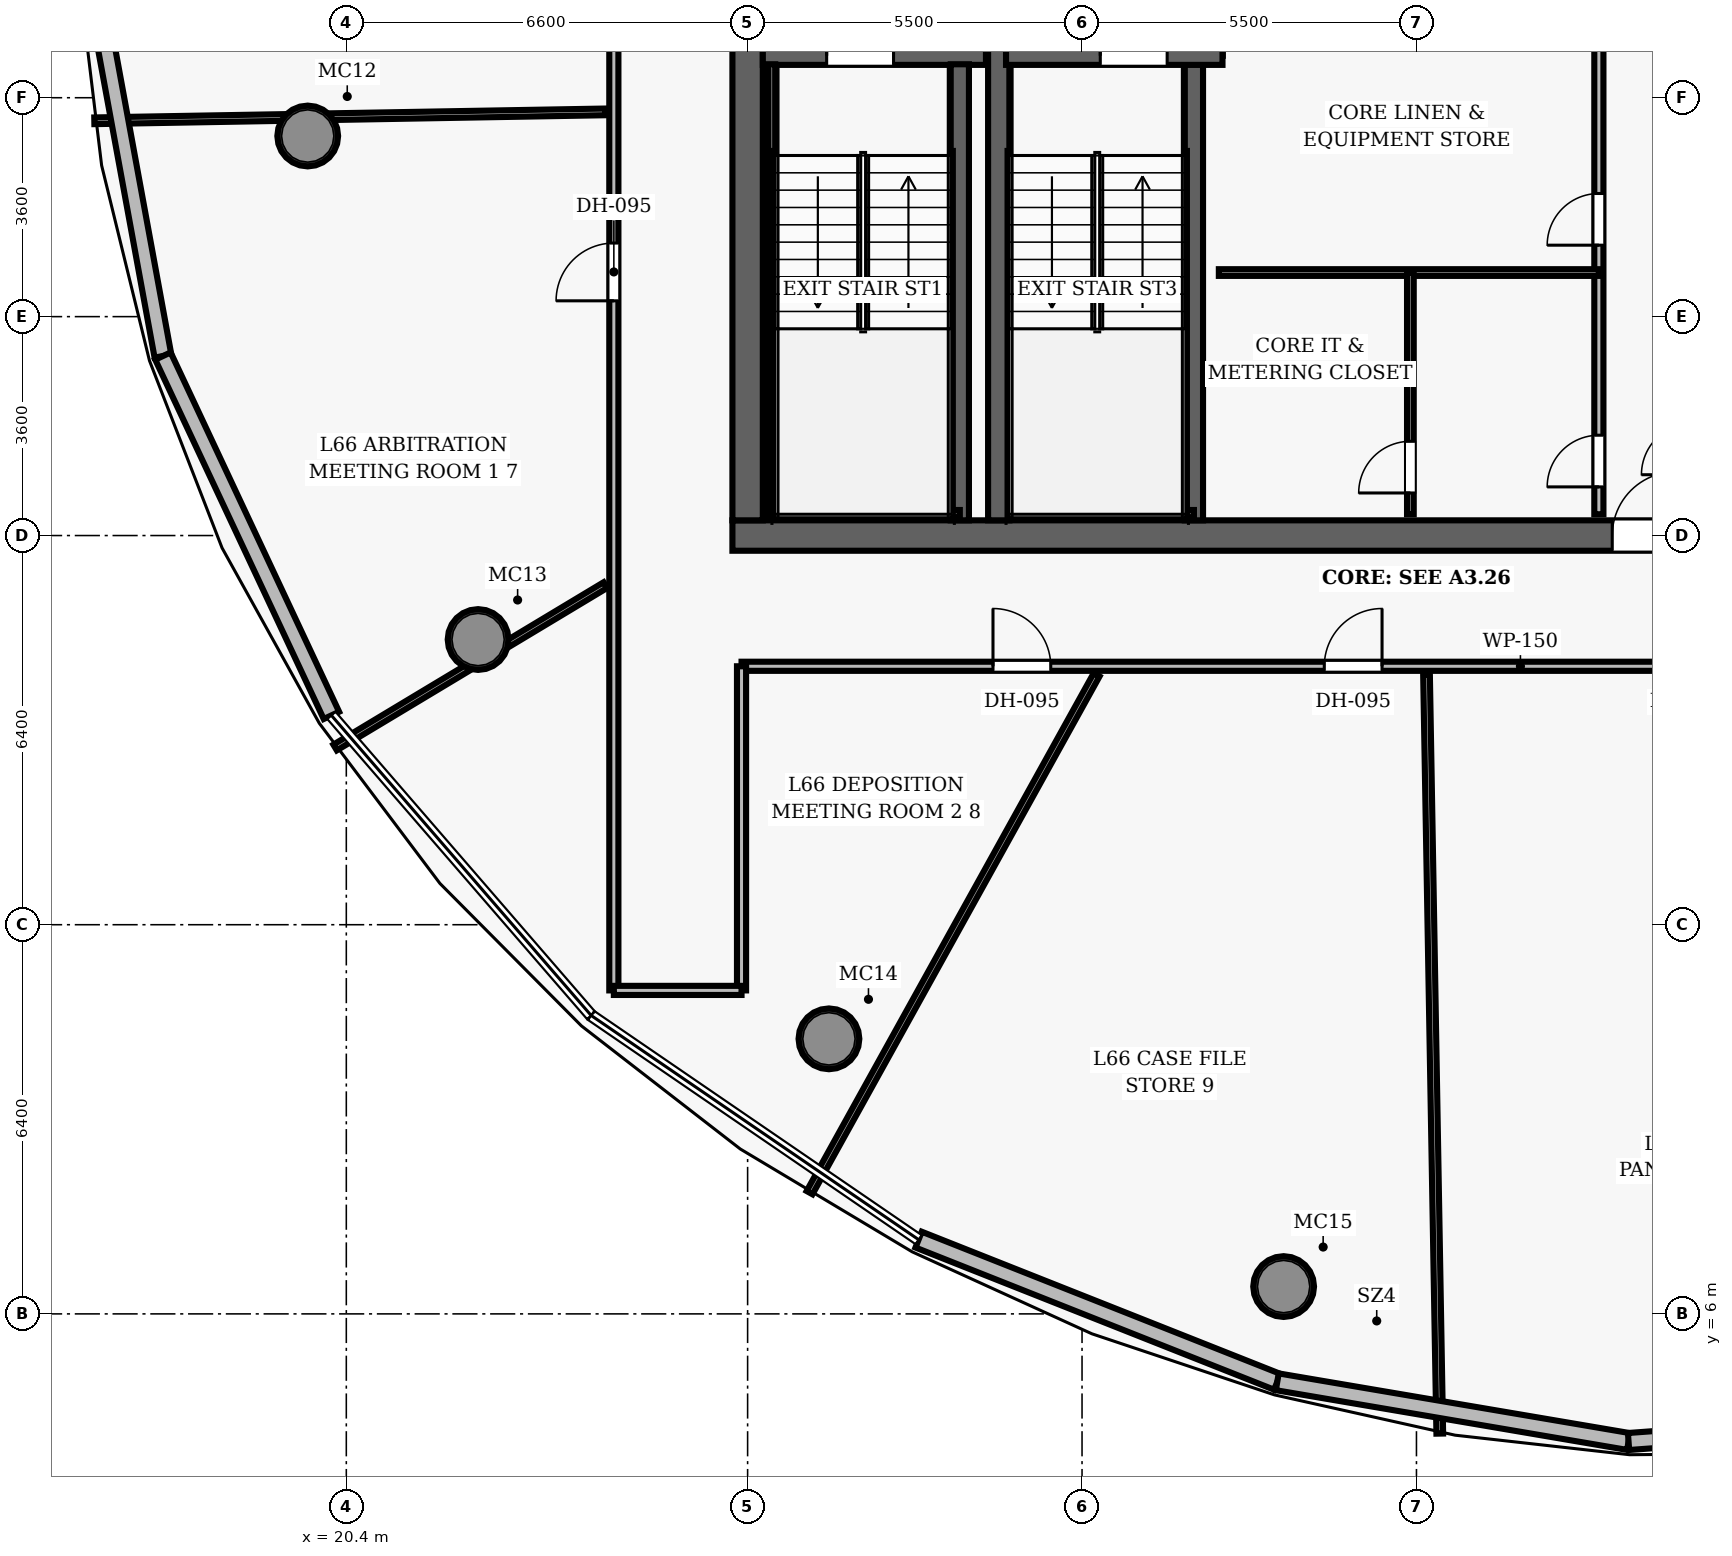
"""IFC4 building model, lengths in metres.
Left out: names, types, materials, properties, quantities, classifications, styles, units other than length and angle.
Written with IfcOpenShell. Run it as: python <this file> out.ifc"""

import sys

from ifc_helpers import new_model, si_unit, direction, frame, frame_2d, origin, origin_2d, place, context, subcontext, project, spatial, rectangle, hollow_circle, extrude, element, fill, save


model = new_model("IFC4")
c1 = context("Model", 3, precision=1e-05, world=origin(), true_north=direction((0.0, 1.0)))
c2 = subcontext(c1, "Body", "Model", "MODEL_VIEW")
j1 = project(units=[si_unit("LENGTHUNIT", "METRE"), si_unit("PLANEANGLEUNIT", "RADIAN")], contexts=[c1])
p1 = place(None, origin())
s1 = spatial("IfcSite", under=j1, at=p1, CompositionType="ELEMENT")
p2 = place(p1, origin())
s2 = spatial("IfcBuilding", under=s1, at=p2, CompositionType="ELEMENT")
p3 = place(p2, frame((0.0, 0.0, 261.3)))
s3 = spatial("IfcBuildingStorey", under=s2, at=p3, CompositionType="ELEMENT", Elevation=261.3)
p4 = place(p3, frame((26.75, 18.8, 0.0), z_axis=(0.0, 0.0, 1.0), x_axis=(1.0, 0.0, 0.0)))
e1 = element("IfcWall", 1, at=p4, inside=s3, PredefinedType="SHEAR", context=c2, shape_type="SweptSolid", body=[
    extrude(rectangle(XDim=22.5, YDim=0.5, at=frame_2d((11.25, 0.0))), origin(), (0.0, 0.0, 1.0), 3.85),
])
p5 = place(p4, frame((14.47, 0.0, 0.0)))
e2 = element("IfcOpeningElement", 2, at=p5, cuts=e1, PredefinedType="OPENING", context=c2, shape_type="SweptSolid", body=[
    extrude(rectangle(XDim=1.05, YDim=2.15, at=frame_2d((0.525, 1.075))), frame((0.0, 0.26, 0.0), z_axis=(0.0, -1.0, 0.0), x_axis=(1.0, 0.0, 0.0)), (0.0, 0.0, 1.0), 0.52),
])
p6 = place(p3, frame((27.0, 19.05, 0.0), z_axis=(0.0, 0.0, 1.0), x_axis=(0.0, 1.0, 0.0)))
e3 = element("IfcWall", 3, at=p6, inside=s3, PredefinedType="SHEAR", context=c2, shape_type="SweptSolid", body=[
    extrude(rectangle(XDim=13.9, YDim=0.5, at=frame_2d((6.95, 0.0))), origin(), (0.0, 0.0, 1.0), 3.85),
])
p7 = place(p6, frame((8.2, 0.0, 0.0)))
e4 = element("IfcOpeningElement", 4, at=p7, cuts=e3, PredefinedType="OPENING", context=c2, shape_type="SweptSolid", body=[
    extrude(rectangle(XDim=1.05, YDim=2.15, at=frame_2d((0.525, 1.075))), frame((0.0, 0.26, 0.0), z_axis=(0.0, -1.0, 0.0), x_axis=(1.0, 0.0, 0.0)), (0.0, 0.0, 1.0), 0.52),
])
p8 = place(p3, frame((31.13, 19.05, 0.0), z_axis=(0.0, 0.0, 1.0), x_axis=(0.0, 1.0, 0.0)))
e5 = element("IfcWall", 5, at=p8, inside=s3, PredefinedType="SHEAR", context=c2, shape_type="SweptSolid", body=[
    extrude(rectangle(XDim=13.9, YDim=0.35, at=frame_2d((6.95, 0.0))), origin(), (0.0, 0.0, 1.0), 3.85),
])
for number, where, z_axis, x_axis in (
    (6, (19.765, 25.371, 0.0), (0.0, 0.0, 1.0), (1.0, 0.0, 0.0)),
    (7, (22.567, 17.09, 0.0), (0.0, 0.0, 1.0), (1.0, 0.0, 0.0)),
    (8, (28.338, 10.523, 0.0), (0.0, 0.0, 1.0), (1.0, 0.0, 0.0)),
    (9, (35.815, 6.449, 0.0), (0.0, 0.0, 1.0), (1.0, 0.0, 0.0)),
):
    element("IfcColumn", number, at=place(p3, frame(where, z_axis=z_axis, x_axis=x_axis)), inside=s3, PredefinedType="COLUMN", context=c2, shape_type="SweptSolid", body=[
        extrude(hollow_circle(Radius=0.5, WallThickness=0.045, at=origin_2d()), origin(), (0.0, 0.0, 1.0), 3.85),
    ])
p9 = place(p3, frame((27.25, 26.69, 0.0), z_axis=(0.0, 0.0, 1.0), x_axis=(1.0, 0.0, 0.0)))
e10 = element("IfcWall", 10, at=p9, inside=s3, PredefinedType="SHEAR", context=c2, shape_type="SweptSolid", body=[
    extrude(rectangle(XDim=3.67, YDim=0.3, at=frame_2d((1.835, 0.0))), origin(), (0.0, 0.0, 1.0), 3.85),
])
p10 = place(p9, frame((1.05, 0.0, 0.0)))
e11 = element("IfcOpeningElement", 11, at=p10, cuts=e10, PredefinedType="OPENING", context=c2, shape_type="SweptSolid", body=[
    extrude(rectangle(XDim=1.1, YDim=2.15, at=frame_2d((0.55, 1.075))), frame((0.0, 0.16, 0.0), z_axis=(0.0, -1.0, 0.0), x_axis=(1.0, 0.0, 0.0)), (0.0, 0.0, 1.0), 0.32),
])
p11 = place(p3, frame((30.49, 19.05, 0.0), z_axis=(0.0, 0.0, 1.0), x_axis=(0.0, 1.0, 0.0)))
e12 = element("IfcWall", 12, at=p11, inside=s3, PredefinedType="SHEAR", context=c2, shape_type="SweptSolid", body=[
    extrude(rectangle(XDim=7.5, YDim=0.3, at=frame_2d((3.75, 0.0))), origin(), (0.0, 0.0, 1.0), 3.85),
])
p12 = place(p3, frame((27.395, 19.1, 0.0), z_axis=(0.0, 0.0, 1.0), x_axis=(0.0, 1.0, 0.0)))
e13 = element("IfcWall", 13, at=p12, inside=s3, PredefinedType="SHEAR", context=c2, shape_type="SweptSolid", body=[
    extrude(rectangle(XDim=7.45, YDim=0.12, at=frame_2d((3.725, 0.0))), origin(), (0.0, 0.0, 1.0), 3.85),
])
p13 = place(p3, frame((27.395, 19.16, 0.0), z_axis=(0.0, 0.0, 1.0), x_axis=(1.0, 0.0, 0.0)))
e14 = element("IfcWall", 14, at=p13, inside=s3, PredefinedType="SHEAR", context=c2, shape_type="SweptSolid", body=[
    extrude(rectangle(XDim=3.095, YDim=0.12, at=frame_2d((1.547, 0.0))), origin(), (0.0, 0.0, 1.0), 3.85),
])
p14 = place(p3, frame((34.34, 19.05, 0.0), z_axis=(0.0, 0.0, 1.0), x_axis=(0.0, 1.0, 0.0)))
e15 = element("IfcWall", 15, at=p14, inside=s3, PredefinedType="SHEAR", context=c2, shape_type="SweptSolid", body=[
    extrude(rectangle(XDim=7.5, YDim=0.3, at=frame_2d((3.75, 0.0))), origin(), (0.0, 0.0, 1.0), 3.85),
])
p15 = place(p3, frame((34.64, 26.69, 0.0), z_axis=(0.0, 0.0, 1.0), x_axis=(0.0, 1.0, 0.0)))
e16 = element("IfcWall", 16, at=p15, inside=s3, PredefinedType="SHEAR", context=c2, shape_type="SweptSolid", body=[
    extrude(rectangle(XDim=6.26, YDim=0.35, at=frame_2d((3.13, 0.0))), origin(), (0.0, 0.0, 1.0), 3.85),
])
p16 = place(p15, frame((0.85, 0.0, 0.0)))
e17 = element("IfcOpeningElement", 17, at=p16, cuts=e16, PredefinedType="OPENING", context=c2, shape_type="SweptSolid", body=[
    extrude(rectangle(XDim=1.05, YDim=2.15, at=frame_2d((0.525, 1.075))), frame((0.0, 0.185, 0.0), z_axis=(0.0, -1.0, 0.0), x_axis=(1.0, 0.0, 0.0)), (0.0, 0.0, 1.0), 0.37),
])
p17 = place(p3, frame((31.25, 26.69, 0.0), z_axis=(0.0, 0.0, 1.0), x_axis=(1.0, 0.0, 0.0)))
e18 = element("IfcWall", 18, at=p17, inside=s3, PredefinedType="SHEAR", context=c2, shape_type="SweptSolid", body=[
    extrude(rectangle(XDim=3.56, YDim=0.3, at=frame_2d((1.78, 0.0))), origin(), (0.0, 0.0, 1.0), 3.85),
])
p18 = place(p17, frame((1.55, 0.0, 0.0)))
e19 = element("IfcOpeningElement", 19, at=p18, cuts=e18, PredefinedType="OPENING", context=c2, shape_type="SweptSolid", body=[
    extrude(rectangle(XDim=1.1, YDim=2.15, at=frame_2d((0.55, 1.075))), frame((0.0, 0.16, 0.0), z_axis=(0.0, -1.0, 0.0), x_axis=(1.0, 0.0, 0.0)), (0.0, 0.0, 1.0), 0.32),
])
p19 = place(p3, frame((31.3, 19.16, 0.0), z_axis=(0.0, 0.0, 1.0), x_axis=(1.0, 0.0, 0.0)))
e20 = element("IfcWall", 20, at=p19, inside=s3, PredefinedType="SHEAR", context=c2, shape_type="SweptSolid", body=[
    extrude(rectangle(XDim=3.04, YDim=0.12, at=frame_2d((1.52, 0.0))), origin(), (0.0, 0.0, 1.0), 3.85),
])
p20 = place(p3, frame((41.0, 19.15, 0.0), z_axis=(0.0, 0.0, 1.0), x_axis=(0.0, 1.0, 0.0)))
e21 = element("IfcWall", 21, at=p20, inside=s3, PredefinedType="PARTITIONING", context=c2, shape_type="SweptSolid", body=[
    extrude(rectangle(XDim=7.95, YDim=0.15, at=frame_2d((3.975, 0.0))), origin(), (0.0, 0.0, 1.0), 3.04),
])
p21 = place(p20, frame((4.425, 0.0, 0.0)))
e22 = element("IfcOpeningElement", 22, at=p21, cuts=e21, PredefinedType="OPENING", context=c2, shape_type="SweptSolid", body=[
    extrude(rectangle(XDim=0.85, YDim=2.1, at=frame_2d((0.425, 1.05))), frame((0.0, 0.085, 0.0), z_axis=(0.0, -1.0, 0.0), x_axis=(1.0, 0.0, 0.0)), (0.0, 0.0, 1.0), 0.17),
])
p22 = place(p20, frame((0.45, 0.0, 0.0)))
e23 = element("IfcOpeningElement", 23, at=p22, cuts=e21, PredefinedType="OPENING", context=c2, shape_type="SweptSolid", body=[
    extrude(rectangle(XDim=0.85, YDim=2.1, at=frame_2d((0.425, 1.05))), frame((0.0, 0.085, 0.0), z_axis=(0.0, -1.0, 0.0), x_axis=(1.0, 0.0, 0.0)), (0.0, 0.0, 1.0), 0.17),
])
p23 = place(p3, frame((34.75, 23.125, 0.0), z_axis=(0.0, 0.0, 1.0), x_axis=(1.0, 0.0, 0.0)))
e24 = element("IfcWall", 24, at=p23, inside=s3, PredefinedType="PARTITIONING", context=c2, shape_type="SweptSolid", body=[
    extrude(rectangle(XDim=6.25, YDim=0.11, at=frame_2d((3.125, 0.0))), origin(), (0.0, 0.0, 1.0), 3.04),
])
p24 = place(p3, frame((37.9, 19.15, 0.0), z_axis=(0.0, 0.0, 1.0), x_axis=(0.0, 1.0, 0.0)))
e25 = element("IfcWall", 25, at=p24, inside=s3, PredefinedType="PARTITIONING", context=c2, shape_type="SweptSolid", body=[
    extrude(rectangle(XDim=3.975, YDim=0.11, at=frame_2d((1.988, 0.0))), origin(), (0.0, 0.0, 1.0), 3.04),
])
p25 = place(p24, frame((0.35, 0.0, 0.0)))
e26 = element("IfcOpeningElement", 26, at=p25, cuts=e25, PredefinedType="OPENING", context=c2, shape_type="SweptSolid", body=[
    extrude(rectangle(XDim=0.85, YDim=2.1, at=frame_2d((0.425, 1.05))), frame((0.0, 0.065, 0.0), z_axis=(0.0, -1.0, 0.0), x_axis=(1.0, 0.0, 0.0)), (0.0, 0.0, 1.0), 0.13),
])
p26 = place(p3, frame((26.9, 16.65, 0.0), z_axis=(0.0, 0.0, 1.0), x_axis=(1.0, 0.0, 0.0)))
e27 = element("IfcWall", 27, at=p26, inside=s3, PredefinedType="PARTITIONING", context=c2, shape_type="SweptSolid", body=[
    extrude(rectangle(XDim=22.2, YDim=0.15, at=frame_2d((11.1, 0.0))), origin(), (0.0, 0.0, 1.0), 3.04),
])
p27 = place(p26, frame((4.135, 0.0, 0.0)))
e28 = element("IfcOpeningElement", 28, at=p27, cuts=e27, PredefinedType="OPENING", context=c2, shape_type="SweptSolid", body=[
    extrude(rectangle(XDim=0.95, YDim=2.15, at=frame_2d((0.475, 1.075))), frame((0.0, 0.085, 0.0), z_axis=(0.0, -1.0, 0.0), x_axis=(1.0, 0.0, 0.0)), (0.0, 0.0, 1.0), 0.17),
])
p28 = place(p26, frame((9.584, 0.0, 0.0)))
e29 = element("IfcOpeningElement", 29, at=p28, cuts=e27, PredefinedType="OPENING", context=c2, shape_type="SweptSolid", body=[
    extrude(rectangle(XDim=0.95, YDim=2.15, at=frame_2d((0.475, 1.075))), frame((0.0, 0.085, 0.0), z_axis=(0.0, -1.0, 0.0), x_axis=(1.0, 0.0, 0.0)), (0.0, 0.0, 1.0), 0.17),
])
p29 = place(p26, frame((15.086, 0.0, 0.0)))
e30 = element("IfcOpeningElement", 30, at=p29, cuts=e27, PredefinedType="OPENING", context=c2, shape_type="SweptSolid", body=[
    extrude(rectangle(XDim=0.95, YDim=2.15, at=frame_2d((0.475, 1.075))), frame((0.0, 0.085, 0.0), z_axis=(0.0, -1.0, 0.0), x_axis=(1.0, 0.0, 0.0)), (0.0, 0.0, 1.0), 0.17),
])
p30 = place(p26, frame((17.445, 0.0, 0.0)))
e31 = element("IfcOpeningElement", 31, at=p30, cuts=e27, PredefinedType="OPENING", context=c2, shape_type="SweptSolid", body=[
    extrude(rectangle(XDim=0.95, YDim=2.15, at=frame_2d((0.475, 1.075))), frame((0.0, 0.085, 0.0), z_axis=(0.0, -1.0, 0.0), x_axis=(1.0, 0.0, 0.0)), (0.0, 0.0, 1.0), 0.17),
])
p31 = place(p3, frame((24.8, 11.32, 0.0), z_axis=(0.0, 0.0, 1.0), x_axis=(0.0, 1.0, 0.0)))
e32 = element("IfcWall", 32, at=p31, inside=s3, PredefinedType="PARTITIONING", context=c2, shape_type="SweptSolid", body=[
    extrude(rectangle(XDim=30.08, YDim=0.15, at=frame_2d((15.04, 0.0))), origin(), (0.0, 0.0, 1.0), 3.04),
])
p32 = place(p31, frame((15.729, 0.0, 0.0)))
e33 = element("IfcOpeningElement", 33, at=p32, cuts=e32, PredefinedType="OPENING", context=c2, shape_type="SweptSolid", body=[
    extrude(rectangle(XDim=0.95, YDim=2.15, at=frame_2d((0.475, 1.075))), frame((0.0, 0.085, 0.0), z_axis=(0.0, -1.0, 0.0), x_axis=(1.0, 0.0, 0.0)), (0.0, 0.0, 1.0), 0.17),
])
p33 = place(p31, frame((11.34, 0.0, 0.0)))
e34 = element("IfcOpeningElement", 34, at=p33, cuts=e32, PredefinedType="OPENING", context=c2, shape_type="SweptSolid", body=[
    extrude(rectangle(XDim=0.95, YDim=2.15, at=frame_2d((0.475, 1.075))), frame((0.0, 0.085, 0.0), z_axis=(0.0, -1.0, 0.0), x_axis=(1.0, 0.0, 0.0)), (0.0, 0.0, 1.0), 0.17),
])
p34 = place(p3, frame((26.9, 11.32, 0.0), z_axis=(0.0, 0.0, 1.0), x_axis=(0.0, 1.0, 0.0)))
e35 = element("IfcWall", 35, at=p34, inside=s3, PredefinedType="PARTITIONING", context=c2, shape_type="SweptSolid", body=[
    extrude(rectangle(XDim=5.33, YDim=0.15, at=frame_2d((2.665, 0.0))), origin(), (0.0, 0.0, 1.0), 3.04),
])
p35 = place(p3, frame((24.8, 11.32, 0.0), z_axis=(0.0, 0.0, 1.0), x_axis=(1.0, 0.0, 0.0)))
e36 = element("IfcWall", 36, at=p35, inside=s3, PredefinedType="PARTITIONING", context=c2, shape_type="SweptSolid", body=[
    extrude(rectangle(XDim=2.1, YDim=0.15, at=frame_2d((1.05, 0.0))), origin(), (0.0, 0.0, 1.0), 3.04),
])
p36 = place(p3, frame((24.66, 25.767, 0.0), z_axis=(0.0, 0.0, 1.0), x_axis=(-0.999848137376, -0.017427053289, 0.0)))
e37 = element("IfcWall", 37, at=p36, inside=s3, PredefinedType="PARTITIONING", context=c2, shape_type="SweptSolid", body=[
    extrude(rectangle(XDim=8.406, YDim=0.11, at=frame_2d((4.203, 0.0))), origin(), (0.0, 0.0, 1.0), 3.04),
])
p37 = place(p3, frame((24.66, 17.985, 0.0), z_axis=(0.0, 0.0, 1.0), x_axis=(-0.857168687415, -0.515035767026, 0.0)))
e38 = element("IfcWall", 38, at=p37, inside=s3, PredefinedType="PARTITIONING", context=c2, shape_type="SweptSolid", body=[
    extrude(rectangle(XDim=5.185, YDim=0.11, at=frame_2d((2.592, 0.0))), origin(), (0.0, 0.0, 1.0), 3.04),
])
p38 = place(p3, frame((32.74, 16.51, 0.0), z_axis=(0.0, 0.0, 1.0), x_axis=(-0.484810336768, -0.874619309965, 0.0)))
e39 = element("IfcWall", 39, at=p38, inside=s3, PredefinedType="PARTITIONING", context=c2, shape_type="SweptSolid", body=[
    extrude(rectangle(XDim=9.737, YDim=0.11, at=frame_2d((4.869, 0.0))), origin(), (0.0, 0.0, 1.0), 3.04),
])
p39 = place(p3, frame((38.166, 16.51, 0.0), z_axis=(0.0, 0.0, 1.0), x_axis=(0.017468427639, -0.999847415377, 0.0)))
e40 = element("IfcWall", 40, at=p39, inside=s3, PredefinedType="PARTITIONING", context=c2, shape_type="SweptSolid", body=[
    extrude(rectangle(XDim=12.481, YDim=0.11, at=frame_2d((6.24, 0.0))), origin(), (0.0, 0.0, 1.0), 3.04),
])
p40 = place(p3, frame((17.385, 21.752, 0.0), z_axis=(0.0, 0.0, 1.0), x_axis=(-0.180429210123, 0.983587972748, 0.0)))
e41 = element("IfcWall", 41, at=p40, inside=s3, PredefinedType="SOLIDWALL", context=c2, shape_type="SweptSolid", body=[
    extrude(rectangle(XDim=6.526, YDim=0.28, at=frame_2d((3.263, 0.0))), origin(), (0.0, 0.0, 1.0), 3.625),
])
p41 = place(p3, frame((20.155, 15.842, 0.0), z_axis=(0.0, 0.0, 1.0), x_axis=(-0.424477959748, 0.905438270501, 0.0)))
e42 = element("IfcWall", 42, at=p41, inside=s3, PredefinedType="SOLIDWALL", context=c2, shape_type="SweptSolid", body=[
    extrude(rectangle(XDim=6.527, YDim=0.28, at=frame_2d((3.263, 0.0))), origin(), (0.0, 0.0, 1.0), 3.625),
])
p42 = place(p3, frame((35.711, 4.883, 0.0), z_axis=(0.0, 0.0, 1.0), x_axis=(-0.929644948575, 0.368456604758, 0.0)))
e43 = element("IfcWall", 43, at=p42, inside=s3, PredefinedType="SOLIDWALL", context=c2, shape_type="SweptSolid", body=[
    extrude(rectangle(XDim=6.345, YDim=0.28, at=frame_2d((3.172, 0.0))), origin(), (0.0, 0.0, 1.0), 3.625),
])
p43 = place(p3, frame((41.488, 3.901, 0.0), z_axis=(0.0, 0.0, 1.0), x_axis=(-0.985868784633, 0.167519370479, 0.0)))
e44 = element("IfcWall", 44, at=p43, inside=s3, PredefinedType="SOLIDWALL", context=c2, shape_type="SweptSolid", body=[
    extrude(rectangle(XDim=5.86, YDim=0.28, at=frame_2d((2.93, 0.0))), origin(), (0.0, 0.0, 1.0), 3.625),
])
p44 = place(p3, frame((46.654, 4.28, 0.0), z_axis=(0.0, 0.0, 1.0), x_axis=(-0.99732023432, -0.073159758173, 0.0)))
e45 = element("IfcWall", 45, at=p44, inside=s3, PredefinedType="SOLIDWALL", context=c2, shape_type="SweptSolid", body=[
    extrude(rectangle(XDim=5.179, YDim=0.28, at=frame_2d((2.59, 0.0))), origin(), (0.0, 0.0, 1.0), 3.625),
])
p45 = place(p10, origin())
e46 = element("IfcDoor", 46, at=p45, inside=s3, OperationType="SINGLE_SWING_LEFT", PredefinedType="DOOR", context=c2, shape_type="SweptSolid", body=[
    extrude(rectangle(XDim=1.1, YDim=2.15, at=frame_2d((0.55, 1.075))), frame((0.0, 0.025, 0.0), z_axis=(0.0, -1.0, 0.0), x_axis=(1.0, 0.0, 0.0)), (0.0, 0.0, 1.0), 0.05),
])
fill(e11, e46)
p46 = place(p18, origin())
e47 = element("IfcDoor", 47, at=p46, inside=s3, OperationType="SINGLE_SWING_LEFT", PredefinedType="DOOR", context=c2, shape_type="SweptSolid", body=[
    extrude(rectangle(XDim=1.1, YDim=2.15, at=frame_2d((0.55, 1.075))), frame((0.0, 0.025, 0.0), z_axis=(0.0, -1.0, 0.0), x_axis=(1.0, 0.0, 0.0)), (0.0, 0.0, 1.0), 0.05),
])
fill(e19, e47)
p47 = place(p5, origin())
e48 = element("IfcDoor", 48, at=p47, inside=s3, OperationType="SINGLE_SWING_RIGHT", PredefinedType="DOOR", context=c2, shape_type="SweptSolid", body=[
    extrude(rectangle(XDim=1.05, YDim=2.15, at=frame_2d((0.525, 1.075))), frame((0.0, 0.025, 0.0), z_axis=(0.0, -1.0, 0.0), x_axis=(1.0, 0.0, 0.0)), (0.0, 0.0, 1.0), 0.05),
])
fill(e2, e48)
p48 = place(p21, origin())
e49 = element("IfcDoor", 49, at=p48, inside=s3, OperationType="SINGLE_SWING_LEFT", PredefinedType="DOOR", context=c2, shape_type="SweptSolid", body=[
    extrude(rectangle(XDim=0.85, YDim=2.1, at=frame_2d((0.425, 1.05))), frame((0.0, 0.025, 0.0), z_axis=(0.0, -1.0, 0.0), x_axis=(1.0, 0.0, 0.0)), (0.0, 0.0, 1.0), 0.05),
])
fill(e22, e49)
p49 = place(p22, origin())
e50 = element("IfcDoor", 50, at=p49, inside=s3, OperationType="SINGLE_SWING_LEFT", PredefinedType="DOOR", context=c2, shape_type="SweptSolid", body=[
    extrude(rectangle(XDim=0.85, YDim=2.1, at=frame_2d((0.425, 1.05))), frame((0.0, 0.025, 0.0), z_axis=(0.0, -1.0, 0.0), x_axis=(1.0, 0.0, 0.0)), (0.0, 0.0, 1.0), 0.05),
])
fill(e23, e50)
p50 = place(p25, origin())
e51 = element("IfcDoor", 51, at=p50, inside=s3, OperationType="SINGLE_SWING_LEFT", PredefinedType="DOOR", context=c2, shape_type="SweptSolid", body=[
    extrude(rectangle(XDim=0.85, YDim=2.1, at=frame_2d((0.425, 1.05))), frame((0.0, 0.025, 0.0), z_axis=(0.0, -1.0, 0.0), x_axis=(1.0, 0.0, 0.0)), (0.0, 0.0, 1.0), 0.05),
])
fill(e26, e51)
p51 = place(p33, origin())
e52 = element("IfcDoor", 52, at=p51, inside=s3, OperationType="SINGLE_SWING_LEFT", PredefinedType="DOOR", context=c2, shape_type="SweptSolid", body=[
    extrude(rectangle(XDim=0.95, YDim=2.15, at=frame_2d((0.475, 1.075))), frame((0.0, 0.025, 0.0), z_axis=(0.0, -1.0, 0.0), x_axis=(1.0, 0.0, 0.0)), (0.0, 0.0, 1.0), 0.05),
])
fill(e34, e52)
p52 = place(p27, origin())
e53 = element("IfcDoor", 53, at=p52, inside=s3, OperationType="SINGLE_SWING_LEFT", PredefinedType="DOOR", context=c2, shape_type="SweptSolid", body=[
    extrude(rectangle(XDim=0.95, YDim=2.15, at=frame_2d((0.475, 1.075))), frame((0.0, 0.025, 0.0), z_axis=(0.0, -1.0, 0.0), x_axis=(1.0, 0.0, 0.0)), (0.0, 0.0, 1.0), 0.05),
])
fill(e28, e53)
p53 = place(p28, origin())
e54 = element("IfcDoor", 54, at=p53, inside=s3, OperationType="SINGLE_SWING_RIGHT", PredefinedType="DOOR", context=c2, shape_type="SweptSolid", body=[
    extrude(rectangle(XDim=0.95, YDim=2.15, at=frame_2d((0.475, 1.075))), frame((0.0, 0.025, 0.0), z_axis=(0.0, -1.0, 0.0), x_axis=(1.0, 0.0, 0.0)), (0.0, 0.0, 1.0), 0.05),
])
fill(e29, e54)
save(model, sys.argv[1])
